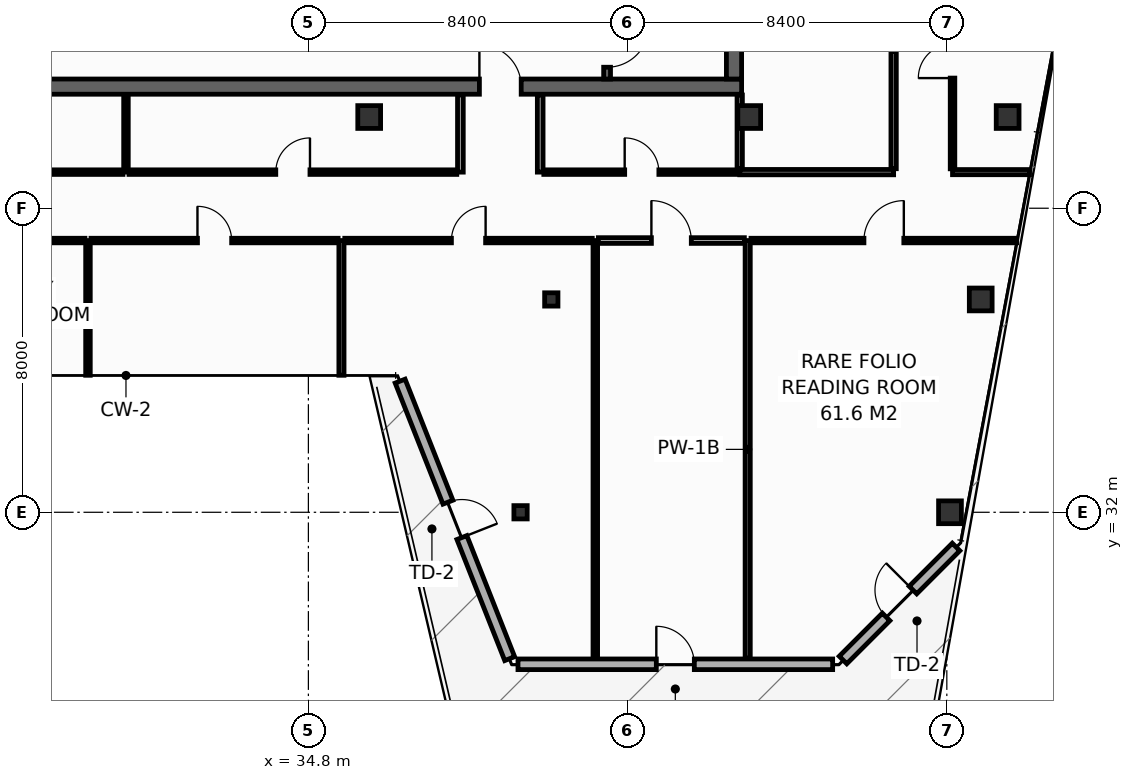
"""IFC4 building model, lengths in metres.
Left out: names, types, materials, properties, quantities, classifications, styles, units other than length and angle.
Written with IfcOpenShell. Run it as: python <this file> out.ifc"""

import sys

from ifc_helpers import new_model, si_unit, direction, frame, frame_2d, origin, origin_2d, place, context, subcontext, project, spatial, rectangle, hollow_rectangle, extrude, element, fill, save


model = new_model("IFC4")
c1 = context("Model", 3, precision=1e-05, world=origin(), true_north=direction((0.0, 1.0)))
c2 = subcontext(c1, "Body", "Model", "MODEL_VIEW")
j1 = project(units=[si_unit("LENGTHUNIT", "METRE"), si_unit("PLANEANGLEUNIT", "RADIAN")], contexts=[c1])
p1 = place(None, origin())
s1 = spatial("IfcSite", under=j1, at=p1, CompositionType="ELEMENT")
p2 = place(p1, origin())
s2 = spatial("IfcBuilding", under=s1, at=p2, CompositionType="ELEMENT")
p3 = place(p2, frame((0.0, 0.0, 276.2)))
s3 = spatial("IfcBuildingStorey", under=s2, at=p3, CompositionType="ELEMENT", Elevation=276.2)
p4 = place(p3, frame((13.7, 43.2, 0.0), z_axis=(0.0, 0.0, 1.0), x_axis=(1.0, 0.0, 0.0)))
e1 = element("IfcWall", 1, at=p4, inside=s3, PredefinedType="SHEAR", context=c2, shape_type="SweptSolid", body=[
    extrude(rectangle(XDim=32.5, YDim=0.4, at=frame_2d((16.25, 0.0))), origin(), (0.0, 0.0, 1.0), 3.55),
])
p5 = place(p4, frame((5.4, 0.0, 0.0)))
e2 = element("IfcOpeningElement", 2, at=p5, cuts=e1, PredefinedType="OPENING", context=c2, shape_type="SweptSolid", body=[
    extrude(rectangle(XDim=1.1, YDim=2.15, at=frame_2d((0.55, 1.075))), frame((0.0, 0.21, 0.0), z_axis=(0.0, -1.0, 0.0), x_axis=(1.0, 0.0, 0.0)), (0.0, 0.0, 1.0), 0.42),
])
p6 = place(p4, frame((25.6, 0.0, 0.0)))
e3 = element("IfcOpeningElement", 3, at=p6, cuts=e1, PredefinedType="OPENING", context=c2, shape_type="SweptSolid", body=[
    extrude(rectangle(XDim=1.1, YDim=2.15, at=frame_2d((0.55, 1.075))), frame((0.0, 0.21, 0.0), z_axis=(0.0, -1.0, 0.0), x_axis=(1.0, 0.0, 0.0)), (0.0, 0.0, 1.0), 0.42),
])
p7 = place(p3, frame((46.0, 43.4, 0.0), z_axis=(0.0, 0.0, 1.0), x_axis=(0.0, 1.0, 0.0)))
e4 = element("IfcWall", 4, at=p7, inside=s3, PredefinedType="SHEAR", context=c2, shape_type="SweptSolid", body=[
    extrude(rectangle(XDim=10.4, YDim=0.4, at=frame_2d((5.2, 0.0))), origin(), (0.0, 0.0, 1.0), 3.55),
])
for number, where, z_axis, x_axis in (
    (5, (36.4, 42.4, 0.0), (0.0, 0.0, 1.0), (1.0, 0.0, 0.0)),
    (6, (46.4, 42.4, 0.0), (0.0, 0.0, 1.0), (1.0, 0.0, 0.0)),
    (7, (53.2, 42.4, 0.0), (0.0, 0.0, 1.0), (1.0, 0.0, 0.0)),
    (8, (51.683, 32.0, 0.0), (0.0, 0.0, 1.0), (1.0, 0.0, 0.0)),
):
    element("IfcColumn", number, at=place(p3, frame(where, z_axis=z_axis, x_axis=x_axis)), inside=s3, PredefinedType="COLUMN", context=c2, shape_type="SweptSolid", body=[
        extrude(hollow_rectangle(XDim=0.6, YDim=0.6, WallThickness=0.028, at=origin_2d()), origin(), (0.0, 0.0, 1.0), 3.8),
    ])
p8 = place(p3, frame((40.383, 32.0, 0.0), z_axis=(0.0, 0.0, 1.0), x_axis=(1.0, 0.0, 0.0)))
e9 = element("IfcColumn", 9, at=p8, inside=s3, PredefinedType="COLUMN", context=c2, shape_type="SweptSolid", body=[
    extrude(hollow_rectangle(XDim=0.35, YDim=0.35, WallThickness=0.016, at=origin_2d()), origin(), (0.0, 0.0, 1.0), 3.8),
])
p9 = place(p3, frame((52.492, 37.6, 0.0), z_axis=(0.0, 0.0, 1.0), x_axis=(1.0, 0.0, 0.0)))
e10 = element("IfcColumn", 10, at=p9, inside=s3, PredefinedType="COLUMN", context=c2, shape_type="SweptSolid", body=[
    extrude(hollow_rectangle(XDim=0.6, YDim=0.6, WallThickness=0.028, at=origin_2d()), origin(), (0.0, 0.0, 1.0), 3.8),
])
p10 = place(p3, frame((41.192, 37.6, 0.0), z_axis=(0.0, 0.0, 1.0), x_axis=(1.0, 0.0, 0.0)))
e11 = element("IfcColumn", 11, at=p10, inside=s3, PredefinedType="COLUMN", context=c2, shape_type="SweptSolid", body=[
    extrude(hollow_rectangle(XDim=0.35, YDim=0.35, WallThickness=0.016, at=origin_2d()), origin(), (0.0, 0.0, 1.0), 3.8),
])
p11 = place(p3, frame((42.66, 53.8, 0.0), z_axis=(0.0, 0.0, 1.0), x_axis=(0.0, -1.0, 0.0)))
e12 = element("IfcWall", 12, at=p11, inside=s3, PredefinedType="SHEAR", context=c2, shape_type="SweptSolid", body=[
    extrude(rectangle(XDim=10.4, YDim=0.18, at=frame_2d((5.2, 0.0))), origin(), (0.0, 0.0, 1.0), 3.55),
])
p12 = place(p11, frame((8.99, 0.0, 0.0)))
e13 = element("IfcOpeningElement", 13, at=p12, cuts=e12, PredefinedType="OPENING", context=c2, shape_type="SweptSolid", body=[
    extrude(rectangle(XDim=1.1, YDim=2.15, at=frame_2d((0.55, 1.075))), frame((0.0, 0.1, 0.0), z_axis=(0.0, -1.0, 0.0), x_axis=(1.0, 0.0, 0.0)), (0.0, 0.0, 1.0), 0.2),
])
p13 = place(p3, frame((37.214, 35.451, 0.0), z_axis=(0.0, 0.0, 1.0), x_axis=(0.367167242766, -0.930154941846, 0.0)))
e14 = element("IfcWall", 14, at=p13, inside=s3, PredefinedType="STANDARD", context=c2, shape_type="SweptSolid", body=[
    extrude(rectangle(XDim=7.851, YDim=0.28, at=frame_2d((3.925, 0.0))), origin(), (0.0, 0.0, 1.0), 3.55),
])
p14 = place(p13, frame((3.425, 0.0, 0.0)))
e15 = element("IfcOpeningElement", 15, at=p14, cuts=e14, PredefinedType="OPENING", context=c2, shape_type="SweptSolid", body=[
    extrude(rectangle(XDim=1.0, YDim=2.2, at=frame_2d((0.5, 1.1))), frame((0.0, 0.15, 0.0), z_axis=(0.0, -1.0, 0.0), x_axis=(1.0, 0.0, 0.0)), (0.0, 0.0, 1.0), 0.3),
])
p15 = place(p3, frame((40.316, 28.0, 0.0), z_axis=(0.0, 0.0, 1.0), x_axis=(1.0, 0.0, 0.0)))
e16 = element("IfcWall", 16, at=p15, inside=s3, PredefinedType="STANDARD", context=c2, shape_type="SweptSolid", body=[
    extrude(rectangle(XDim=8.28, YDim=0.28, at=frame_2d((4.14, 0.0))), origin(), (0.0, 0.0, 1.0), 3.55),
])
p16 = place(p15, frame((3.64, 0.0, 0.0)))
e17 = element("IfcOpeningElement", 17, at=p16, cuts=e16, PredefinedType="OPENING", context=c2, shape_type="SweptSolid", body=[
    extrude(rectangle(XDim=1.0, YDim=2.2, at=frame_2d((0.5, 1.1))), frame((0.0, 0.15, 0.0), z_axis=(0.0, -1.0, 0.0), x_axis=(1.0, 0.0, 0.0)), (0.0, 0.0, 1.0), 0.3),
])
p17 = place(p3, frame((48.869, 28.113, 0.0), z_axis=(0.0, 0.0, 1.0), x_axis=(0.707106781187, 0.707106781187, 0.0)))
e18 = element("IfcWall", 18, at=p17, inside=s3, PredefinedType="STANDARD", context=c2, shape_type="SweptSolid", body=[
    extrude(rectangle(XDim=4.206, YDim=0.28, at=frame_2d((2.103, 0.0))), origin(), (0.0, 0.0, 1.0), 3.55),
])
p18 = place(p17, frame((1.603, 0.0, 0.0)))
e19 = element("IfcOpeningElement", 19, at=p18, cuts=e18, PredefinedType="OPENING", context=c2, shape_type="SweptSolid", body=[
    extrude(rectangle(XDim=1.0, YDim=2.2, at=frame_2d((0.5, 1.1))), frame((0.0, 0.15, 0.0), z_axis=(0.0, -1.0, 0.0), x_axis=(1.0, 0.0, 0.0)), (0.0, 0.0, 1.0), 0.3),
])
p19 = place(p3, frame((46.15, 40.95, 0.0), z_axis=(0.0, 0.0, 1.0), x_axis=(1.0, 0.0, 0.0)))
e20 = element("IfcWall", 20, at=p19, inside=s3, PredefinedType="PARTITIONING", context=c2, shape_type="SweptSolid", body=[
    extrude(rectangle(XDim=4.05, YDim=0.14, at=frame_2d((2.025, 0.0))), origin(), (0.0, 0.0, 1.0), 3.55),
])
p20 = place(p3, frame((46.15, 41.04, 0.0), z_axis=(0.0, 0.0, 1.0), x_axis=(0.0, 1.0, 0.0)))
e21 = element("IfcWall", 21, at=p20, inside=s3, PredefinedType="PARTITIONING", context=c2, shape_type="SweptSolid", body=[
    extrude(rectangle(XDim=1.94, YDim=0.14, at=frame_2d((0.97, 0.0))), origin(), (0.0, 0.0, 1.0), 3.55),
])
p21 = place(p3, frame((50.2, 41.04, 0.0), z_axis=(0.0, 0.0, 1.0), x_axis=(0.0, 1.0, 0.0)))
e22 = element("IfcWall", 22, at=p21, inside=s3, PredefinedType="PARTITIONING", context=c2, shape_type="SweptSolid", body=[
    extrude(rectangle(XDim=7.07, YDim=0.14, at=frame_2d((3.535, 0.0))), origin(), (0.0, 0.0, 1.0), 2.947),
])
p22 = place(p21, frame((3.085, 0.0, 0.0)))
e23 = element("IfcOpeningElement", 23, at=p22, cuts=e22, PredefinedType="OPENING", context=c2, shape_type="SweptSolid", body=[
    extrude(rectangle(XDim=0.9, YDim=2.1, at=frame_2d((0.45, 1.05))), frame((0.0, 0.08, 0.0), z_axis=(0.0, -1.0, 0.0), x_axis=(1.0, 0.0, 0.0)), (0.0, 0.0, 1.0), 0.16),
])
p23 = place(p3, frame((51.75, 40.95, 0.0), z_axis=(0.0, 0.0, 1.0), x_axis=(1.0, 0.0, 0.0)))
e24 = element("IfcWall", 24, at=p23, inside=s3, PredefinedType="PARTITIONING", context=c2, shape_type="SweptSolid", body=[
    extrude(rectangle(XDim=2.026, YDim=0.135, at=frame_2d((1.013, 0.0))), origin(), (0.0, 0.0, 1.0), 3.085),
])
p24 = place(p3, frame((51.75, 41.038, 0.0), z_axis=(0.0, 0.0, 1.0), x_axis=(0.0, 1.0, 0.0)))
e25 = element("IfcWall", 25, at=p24, inside=s3, PredefinedType="PARTITIONING", context=c2, shape_type="SweptSolid", body=[
    extrude(rectangle(XDim=5.675, YDim=0.12, at=frame_2d((2.837, 0.0))), origin(), (0.0, 0.0, 1.0), 2.947),
])
p25 = place(p24, frame((2.387, 0.0, 0.0)))
e26 = element("IfcOpeningElement", 26, at=p25, cuts=e25, PredefinedType="OPENING", context=c2, shape_type="SweptSolid", body=[
    extrude(rectangle(XDim=0.9, YDim=2.1, at=frame_2d((0.45, 1.05))), frame((0.0, 0.07, 0.0), z_axis=(0.0, -1.0, 0.0), x_axis=(1.0, 0.0, 0.0)), (0.0, 0.0, 1.0), 0.14),
])
for number, where, z_axis, x_axis in (
    (27, (38.8, 40.95, 0.0), (0.0, 0.0, 1.0), (0.0, 1.0, 0.0)),
    (28, (40.9, 40.95, 0.0), (0.0, 0.0, 1.0), (0.0, 1.0, 0.0)),
):
    element("IfcWall", number, at=place(p3, frame(where, z_axis=z_axis, x_axis=x_axis)), inside=s3, PredefinedType="PARTITIONING", context=c2, shape_type="SweptSolid", body=[
        extrude(rectangle(XDim=2.03, YDim=0.15, at=frame_2d((1.015, 0.0))), origin(), (0.0, 0.0, 1.0), 3.55),
    ])
p26 = place(p3, frame((30.0, 40.95, 0.0), z_axis=(0.0, 0.0, 1.0), x_axis=(0.0, 1.0, 0.0)))
e29 = element("IfcWall", 29, at=p26, inside=s3, PredefinedType="PARTITIONING", context=c2, shape_type="SweptSolid", body=[
    extrude(rectangle(XDim=2.03, YDim=0.12, at=frame_2d((1.015, 0.0))), origin(), (0.0, 0.0, 1.0), 2.947),
])
p27 = place(p3, frame((20.795, 40.95, 0.0), z_axis=(0.0, 0.0, 1.0), x_axis=(1.0, 0.0, 0.0)))
e30 = element("IfcWall", 30, at=p27, inside=s3, PredefinedType="PARTITIONING", context=c2, shape_type="SweptSolid", body=[
    extrude(rectangle(XDim=9.125, YDim=0.12, at=frame_2d((4.562, 0.0))), origin(), (0.0, 0.0, 1.0), 2.947),
])
p28 = place(p27, frame((4.037, 0.0, 0.0)))
e31 = element("IfcOpeningElement", 31, at=p28, cuts=e30, PredefinedType="OPENING", context=c2, shape_type="SweptSolid", body=[
    extrude(rectangle(XDim=1.05, YDim=2.15, at=frame_2d((0.525, 1.075))), frame((0.0, 0.07, 0.0), z_axis=(0.0, -1.0, 0.0), x_axis=(1.0, 0.0, 0.0)), (0.0, 0.0, 1.0), 0.14),
])
p29 = place(p3, frame((30.08, 40.95, 0.0), z_axis=(0.0, 0.0, 1.0), x_axis=(1.0, 0.0, 0.0)))
e32 = element("IfcWall", 32, at=p29, inside=s3, PredefinedType="PARTITIONING", context=c2, shape_type="SweptSolid", body=[
    extrude(rectangle(XDim=8.625, YDim=0.12, at=frame_2d((4.312, 0.0))), origin(), (0.0, 0.0, 1.0), 2.947),
])
p30 = place(p29, frame((3.862, 0.0, 0.0)))
e33 = element("IfcOpeningElement", 33, at=p30, cuts=e32, PredefinedType="OPENING", context=c2, shape_type="SweptSolid", body=[
    extrude(rectangle(XDim=0.9, YDim=2.1, at=frame_2d((0.45, 1.05))), frame((0.0, 0.07, 0.0), z_axis=(0.0, -1.0, 0.0), x_axis=(1.0, 0.0, 0.0)), (0.0, 0.0, 1.0), 0.14),
])
p31 = place(p3, frame((40.995, 40.95, 0.0), z_axis=(0.0, 0.0, 1.0), x_axis=(1.0, 0.0, 0.0)))
e34 = element("IfcWall", 34, at=p31, inside=s3, PredefinedType="PARTITIONING", context=c2, shape_type="SweptSolid", body=[
    extrude(rectangle(XDim=5.155, YDim=0.12, at=frame_2d((2.577, 0.0))), origin(), (0.0, 0.0, 1.0), 3.55),
])
p32 = place(p31, frame((2.128, 0.0, 0.0)))
e35 = element("IfcOpeningElement", 35, at=p32, cuts=e34, PredefinedType="OPENING", context=c2, shape_type="SweptSolid", body=[
    extrude(rectangle(XDim=0.9, YDim=2.1, at=frame_2d((0.45, 1.05))), frame((0.0, 0.07, 0.0), z_axis=(0.0, -1.0, 0.0), x_axis=(1.0, 0.0, 0.0)), (0.0, 0.0, 1.0), 0.14),
])
p33 = place(p3, frame((29.0, 35.605, 0.0), z_axis=(0.0, 0.0, 1.0), x_axis=(0.0, 1.0, 0.0)))
e36 = element("IfcWall", 36, at=p33, inside=s3, PredefinedType="PARTITIONING", context=c2, shape_type="SweptSolid", body=[
    extrude(rectangle(XDim=3.545, YDim=0.12, at=frame_2d((1.772, 0.0))), origin(), (0.0, 0.0, 1.0), 3.55),
])
p34 = place(p3, frame((35.67, 35.605, 0.0), z_axis=(0.0, 0.0, 1.0), x_axis=(0.0, 1.0, 0.0)))
e37 = element("IfcWall", 37, at=p34, inside=s3, PredefinedType="PARTITIONING", context=c2, shape_type="SweptSolid", body=[
    extrude(rectangle(XDim=3.545, YDim=0.135, at=frame_2d((1.772, 0.0))), origin(), (0.0, 0.0, 1.0), 3.55),
])
p35 = place(p3, frame((42.35, 28.16, 0.0), z_axis=(0.0, 0.0, 1.0), x_axis=(0.0, 1.0, 0.0)))
e38 = element("IfcWall", 38, at=p35, inside=s3, PredefinedType="PARTITIONING", context=c2, shape_type="SweptSolid", body=[
    extrude(rectangle(XDim=10.99, YDim=0.12, at=frame_2d((5.495, 0.0))), origin(), (0.0, 0.0, 1.0), 2.947),
])
p36 = place(p3, frame((46.36, 28.16, 0.0), z_axis=(0.0, 0.0, 1.0), x_axis=(0.0, 1.0, 0.0)))
e39 = element("IfcWall", 39, at=p36, inside=s3, PredefinedType="PARTITIONING", context=c2, shape_type="SweptSolid", body=[
    extrude(rectangle(XDim=10.99, YDim=0.135, at=frame_2d((5.495, 0.0))), origin(), (0.0, 0.0, 1.0), 2.947),
])
p37 = place(p3, frame((23.857, 39.15, 0.0), z_axis=(0.0, 0.0, 1.0), x_axis=(1.0, 0.0, 0.0)))
e40 = element("IfcWall", 40, at=p37, inside=s3, PredefinedType="PARTITIONING", context=c2, shape_type="SweptSolid", body=[
    extrude(rectangle(XDim=5.062, YDim=0.12, at=frame_2d((2.531, 0.0))), origin(), (0.0, 0.0, 1.0), 3.55),
])
p38 = place(p37, frame((2.081, 0.0, 0.0)))
e41 = element("IfcOpeningElement", 41, at=p38, cuts=e40, PredefinedType="OPENING", context=c2, shape_type="SweptSolid", body=[
    extrude(rectangle(XDim=0.9, YDim=2.1, at=frame_2d((0.45, 1.05))), frame((0.0, 0.07, 0.0), z_axis=(0.0, -1.0, 0.0), x_axis=(1.0, 0.0, 0.0)), (0.0, 0.0, 1.0), 0.14),
])
p39 = place(p3, frame((29.08, 39.15, 0.0), z_axis=(0.0, 0.0, 1.0), x_axis=(1.0, 0.0, 0.0)))
e42 = element("IfcWall", 42, at=p39, inside=s3, PredefinedType="PARTITIONING", context=c2, shape_type="SweptSolid", body=[
    extrude(rectangle(XDim=6.502, YDim=0.12, at=frame_2d((3.251, 0.0))), origin(), (0.0, 0.0, 1.0), 3.55),
])
p40 = place(p39, frame((2.801, 0.0, 0.0)))
e43 = element("IfcOpeningElement", 43, at=p40, cuts=e42, PredefinedType="OPENING", context=c2, shape_type="SweptSolid", body=[
    extrude(rectangle(XDim=0.9, YDim=2.1, at=frame_2d((0.45, 1.05))), frame((0.0, 0.07, 0.0), z_axis=(0.0, -1.0, 0.0), x_axis=(1.0, 0.0, 0.0)), (0.0, 0.0, 1.0), 0.14),
])
p41 = place(p3, frame((35.758, 39.15, 0.0), z_axis=(0.0, 0.0, 1.0), x_axis=(1.0, 0.0, 0.0)))
e44 = element("IfcWall", 44, at=p41, inside=s3, PredefinedType="PARTITIONING", context=c2, shape_type="SweptSolid", body=[
    extrude(rectangle(XDim=6.512, YDim=0.12, at=frame_2d((3.256, 0.0))), origin(), (0.0, 0.0, 1.0), 2.947),
])
p42 = place(p41, frame((2.806, 0.0, 0.0)))
e45 = element("IfcOpeningElement", 45, at=p42, cuts=e44, PredefinedType="OPENING", context=c2, shape_type="SweptSolid", body=[
    extrude(rectangle(XDim=0.9, YDim=2.1, at=frame_2d((0.45, 1.05))), frame((0.0, 0.07, 0.0), z_axis=(0.0, -1.0, 0.0), x_axis=(1.0, 0.0, 0.0)), (0.0, 0.0, 1.0), 0.14),
])
p43 = place(p3, frame((42.43, 39.15, 0.0), z_axis=(0.0, 0.0, 1.0), x_axis=(1.0, 0.0, 0.0)))
e46 = element("IfcWall", 46, at=p43, inside=s3, PredefinedType="PARTITIONING", context=c2, shape_type="SweptSolid", body=[
    extrude(rectangle(XDim=3.843, YDim=0.15, at=frame_2d((1.921, 0.0))), origin(), (0.0, 0.0, 1.0), 3.55),
])
p44 = place(p43, frame((1.396, 0.0, 0.0)))
e47 = element("IfcOpeningElement", 47, at=p44, cuts=e46, PredefinedType="OPENING", context=c2, shape_type="SweptSolid", body=[
    extrude(rectangle(XDim=1.05, YDim=2.15, at=frame_2d((0.525, 1.075))), frame((0.0, 0.085, 0.0), z_axis=(0.0, -1.0, 0.0), x_axis=(1.0, 0.0, 0.0)), (0.0, 0.0, 1.0), 0.17),
])
p45 = place(p3, frame((46.448, 39.15, 0.0), z_axis=(0.0, 0.0, 1.0), x_axis=(1.0, 0.0, 0.0)))
e48 = element("IfcWall", 48, at=p45, inside=s3, PredefinedType="PARTITIONING", context=c2, shape_type="SweptSolid", body=[
    extrude(rectangle(XDim=6.992, YDim=0.12, at=frame_2d((3.496, 0.0))), origin(), (0.0, 0.0, 1.0), 3.085),
])
p46 = place(p45, frame((2.971, 0.0, 0.0)))
e49 = element("IfcOpeningElement", 49, at=p46, cuts=e48, PredefinedType="OPENING", context=c2, shape_type="SweptSolid", body=[
    extrude(rectangle(XDim=1.05, YDim=2.15, at=frame_2d((0.525, 1.075))), frame((0.0, 0.07, 0.0), z_axis=(0.0, -1.0, 0.0), x_axis=(1.0, 0.0, 0.0)), (0.0, 0.0, 1.0), 0.14),
])
p47 = place(p12, origin())
e50 = element("IfcDoor", 50, at=p47, inside=s3, OperationType="SINGLE_SWING_LEFT", PredefinedType="DOOR", context=c2, shape_type="SweptSolid", body=[
    extrude(rectangle(XDim=1.1, YDim=2.15, at=frame_2d((0.55, 1.075))), frame((0.0, 0.025, 0.0), z_axis=(0.0, -1.0, 0.0), x_axis=(1.0, 0.0, 0.0)), (0.0, 0.0, 1.0), 0.05),
])
fill(e13, e50)
p48 = place(p6, origin())
e51 = element("IfcDoor", 51, at=p48, inside=s3, OperationType="SINGLE_SWING_LEFT", PredefinedType="DOOR", context=c2, shape_type="SweptSolid", body=[
    extrude(rectangle(XDim=1.1, YDim=2.15, at=frame_2d((0.55, 1.075))), frame((0.0, 0.025, 0.0), z_axis=(0.0, -1.0, 0.0), x_axis=(1.0, 0.0, 0.0)), (0.0, 0.0, 1.0), 0.05),
])
fill(e3, e51)
p49 = place(p14, origin())
e52 = element("IfcDoor", 52, at=p49, inside=s3, OperationType="SINGLE_SWING_RIGHT", PredefinedType="DOOR", context=c2, shape_type="SweptSolid", body=[
    extrude(rectangle(XDim=1.0, YDim=2.2, at=frame_2d((0.5, 1.1))), frame((0.0, 0.025, 0.0), z_axis=(0.0, -1.0, 0.0), x_axis=(1.0, 0.0, 0.0)), (0.0, 0.0, 1.0), 0.05),
])
fill(e15, e52)
p50 = place(p16, origin())
e53 = element("IfcDoor", 53, at=p50, inside=s3, OperationType="SINGLE_SWING_LEFT", PredefinedType="DOOR", context=c2, shape_type="SweptSolid", body=[
    extrude(rectangle(XDim=1.0, YDim=2.2, at=frame_2d((0.5, 1.1))), frame((0.0, 0.025, 0.0), z_axis=(0.0, -1.0, 0.0), x_axis=(1.0, 0.0, 0.0)), (0.0, 0.0, 1.0), 0.05),
])
fill(e17, e53)
p51 = place(p18, origin())
e54 = element("IfcDoor", 54, at=p51, inside=s3, OperationType="SINGLE_SWING_RIGHT", PredefinedType="DOOR", context=c2, shape_type="SweptSolid", body=[
    extrude(rectangle(XDim=1.0, YDim=2.2, at=frame_2d((0.5, 1.1))), frame((0.0, 0.025, 0.0), z_axis=(0.0, -1.0, 0.0), x_axis=(1.0, 0.0, 0.0)), (0.0, 0.0, 1.0), 0.05),
])
fill(e19, e54)
p52 = place(p25, origin())
e55 = element("IfcDoor", 55, at=p52, inside=s3, OperationType="SINGLE_SWING_LEFT", PredefinedType="DOOR", context=c2, shape_type="SweptSolid", body=[
    extrude(rectangle(XDim=0.9, YDim=2.1, at=frame_2d((0.45, 1.05))), frame((0.0, 0.025, 0.0), z_axis=(0.0, -1.0, 0.0), x_axis=(1.0, 0.0, 0.0)), (0.0, 0.0, 1.0), 0.05),
])
fill(e26, e55)
p53 = place(p30, origin())
e56 = element("IfcDoor", 56, at=p53, inside=s3, OperationType="SINGLE_SWING_RIGHT", PredefinedType="DOOR", context=c2, shape_type="SweptSolid", body=[
    extrude(rectangle(XDim=0.9, YDim=2.1, at=frame_2d((0.45, 1.05))), frame((0.0, 0.025, 0.0), z_axis=(0.0, -1.0, 0.0), x_axis=(1.0, 0.0, 0.0)), (0.0, 0.0, 1.0), 0.05),
])
fill(e33, e56)
p54 = place(p32, origin())
e57 = element("IfcDoor", 57, at=p54, inside=s3, OperationType="SINGLE_SWING_LEFT", PredefinedType="DOOR", context=c2, shape_type="SweptSolid", body=[
    extrude(rectangle(XDim=0.9, YDim=2.1, at=frame_2d((0.45, 1.05))), frame((0.0, 0.025, 0.0), z_axis=(0.0, -1.0, 0.0), x_axis=(1.0, 0.0, 0.0)), (0.0, 0.0, 1.0), 0.05),
])
fill(e35, e57)
p55 = place(p40, origin())
e58 = element("IfcDoor", 58, at=p55, inside=s3, OperationType="SINGLE_SWING_LEFT", PredefinedType="DOOR", context=c2, shape_type="SweptSolid", body=[
    extrude(rectangle(XDim=0.9, YDim=2.1, at=frame_2d((0.45, 1.05))), frame((0.0, 0.025, 0.0), z_axis=(0.0, -1.0, 0.0), x_axis=(1.0, 0.0, 0.0)), (0.0, 0.0, 1.0), 0.05),
])
fill(e43, e58)
p56 = place(p42, origin())
e59 = element("IfcDoor", 59, at=p56, inside=s3, OperationType="SINGLE_SWING_RIGHT", PredefinedType="DOOR", context=c2, shape_type="SweptSolid", body=[
    extrude(rectangle(XDim=0.9, YDim=2.1, at=frame_2d((0.45, 1.05))), frame((0.0, 0.025, 0.0), z_axis=(0.0, -1.0, 0.0), x_axis=(1.0, 0.0, 0.0)), (0.0, 0.0, 1.0), 0.05),
])
fill(e45, e59)
p57 = place(p44, origin())
e60 = element("IfcDoor", 60, at=p57, inside=s3, OperationType="SINGLE_SWING_LEFT", PredefinedType="DOOR", context=c2, shape_type="SweptSolid", body=[
    extrude(rectangle(XDim=1.05, YDim=2.15, at=frame_2d((0.525, 1.075))), frame((0.0, 0.025, 0.0), z_axis=(0.0, -1.0, 0.0), x_axis=(1.0, 0.0, 0.0)), (0.0, 0.0, 1.0), 0.05),
])
fill(e47, e60)
p58 = place(p46, origin())
e61 = element("IfcDoor", 61, at=p58, inside=s3, OperationType="SINGLE_SWING_RIGHT", PredefinedType="DOOR", context=c2, shape_type="SweptSolid", body=[
    extrude(rectangle(XDim=1.05, YDim=2.15, at=frame_2d((0.525, 1.075))), frame((0.0, 0.025, 0.0), z_axis=(0.0, -1.0, 0.0), x_axis=(1.0, 0.0, 0.0)), (0.0, 0.0, 1.0), 0.05),
])
fill(e49, e61)
save(model, sys.argv[1])
